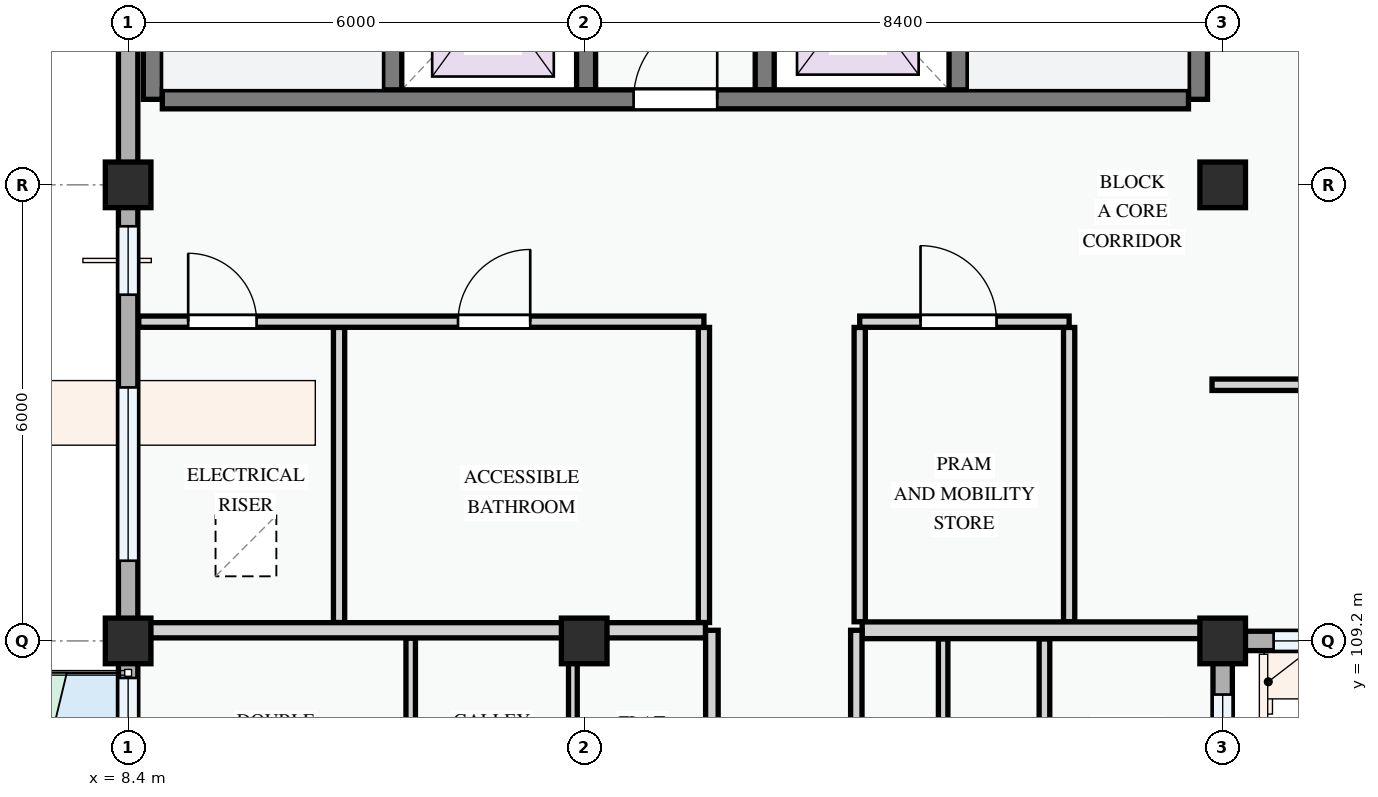
"""IFC4 building model, lengths in metres.
Left out: names, types, materials, properties, quantities, classifications, styles, units other than length and angle.
Written with IfcOpenShell. Run it as: python <this file> out.ifc"""

import sys

from ifc_helpers import new_model, si_unit, direction, frame, frame_2d, origin, origin_2d, place, context, subcontext, project, spatial, rectangle, extrude, element, fill, save


model = new_model("IFC4")
c1 = context("Model", 3, precision=1e-05, world=origin(), true_north=direction((0.0, 1.0)))
c2 = subcontext(c1, "Body", "Model", "MODEL_VIEW")
j1 = project(units=[si_unit("LENGTHUNIT", "METRE"), si_unit("PLANEANGLEUNIT", "RADIAN")], contexts=[c1])
p1 = place(None, origin())
s1 = spatial("IfcSite", under=j1, at=p1, CompositionType="ELEMENT")
p2 = place(p1, origin())
s2 = spatial("IfcBuilding", under=s1, at=p2, CompositionType="ELEMENT")
p3 = place(p2, frame((0.0, 0.0, 37.8)))
s3 = spatial("IfcBuildingStorey", under=s2, at=p3, CompositionType="ELEMENT", Elevation=37.8)
for number, where, z_axis, x_axis in (
    (1, (8.4, 109.2, 0.0), (0.0, 0.0, 1.0), (1.0, 0.0, 0.0)),
    (2, (8.4, 115.2, 0.0), (0.0, 0.0, 1.0), (1.0, 0.0, 0.0)),
    (3, (14.4, 109.2, 0.0), (0.0, 0.0, 1.0), (1.0, 0.0, 0.0)),
    (4, (22.8, 109.2, 0.0), (0.0, 0.0, 1.0), (1.0, 0.0, 0.0)),
    (5, (22.8, 115.2, 0.0), (0.0, 0.0, 1.0), (1.0, 0.0, 0.0)),
):
    element("IfcColumn", number, at=place(p3, frame(where, z_axis=z_axis, x_axis=x_axis)), inside=s3, PredefinedType="COLUMN", context=c2, shape_type="SweptSolid", body=[
        extrude(rectangle(XDim=0.6, YDim=0.6, at=origin_2d()), origin(), (0.0, 0.0, 1.0), 3.3),
    ])
p4 = place(p3, frame((22.8, 109.2, 0.0), z_axis=(0.0, 0.0, 1.0), x_axis=(1.0, 0.0, 0.0)))
e6 = element("IfcWall", 6, at=p4, inside=s3, PredefinedType="STANDARD", context=c2, shape_type="SweptSolid", body=[
    extrude(rectangle(XDim=6.0, YDim=0.255, at=frame_2d((3.0, 0.0))), origin(), (0.0, 0.0, 1.0), 2.525),
])
p5 = place(p4, frame((0.67, 0.0, 0.78)))
e7 = element("IfcOpeningElement", 7, at=p5, cuts=e6, PredefinedType="OPENING", context=c2, shape_type="SweptSolid", body=[
    extrude(rectangle(XDim=1.2, YDim=1.35, at=frame_2d((0.6, 0.675))), frame((0.0, 0.137, 0.0), z_axis=(0.0, -1.0, 0.0), x_axis=(1.0, 0.0, 0.0)), (0.0, 0.0, 1.0), 0.275),
])
p6 = place(p4, frame((3.48, 0.0, 0.78)))
e8 = element("IfcOpeningElement", 8, at=p6, cuts=e6, PredefinedType="OPENING", context=c2, shape_type="SweptSolid", body=[
    extrude(rectangle(XDim=1.2, YDim=1.5, at=frame_2d((0.6, 0.75))), frame((0.0, 0.137, 0.0), z_axis=(0.0, -1.0, 0.0), x_axis=(1.0, 0.0, 0.0)), (0.0, 0.0, 1.0), 0.275),
])
p7 = place(p3, frame((8.4, 123.6, 0.0), z_axis=(0.0, 0.0, 1.0), x_axis=(0.0, -1.0, 0.0)))
e9 = element("IfcWall", 9, at=p7, inside=s3, PredefinedType="STANDARD", context=c2, shape_type="SweptSolid", body=[
    extrude(rectangle(XDim=8.4, YDim=0.255, at=frame_2d((4.2, 0.0))), origin(), (0.0, 0.0, 1.0), 2.425),
])
p8 = place(p7, frame((1.371, 0.0, 0.78)))
e10 = element("IfcOpeningElement", 10, at=p8, cuts=e9, PredefinedType="OPENING", context=c2, shape_type="SweptSolid", body=[
    extrude(rectangle(XDim=1.25, YDim=1.3, at=frame_2d((0.625, 0.65))), frame((0.0, 0.137, 0.0), z_axis=(0.0, -1.0, 0.0), x_axis=(1.0, 0.0, 0.0)), (0.0, 0.0, 1.0), 0.275),
])
p9 = place(p7, frame((4.679, 0.0, 0.78)))
e11 = element("IfcOpeningElement", 11, at=p9, cuts=e9, PredefinedType="OPENING", context=c2, shape_type="SweptSolid", body=[
    extrude(rectangle(XDim=1.58, YDim=1.48, at=frame_2d((0.79, 0.74))), frame((0.0, 0.137, 0.0), z_axis=(0.0, -1.0, 0.0), x_axis=(1.0, 0.0, 0.0)), (0.0, 0.0, 1.0), 0.275),
])
p10 = place(p3, frame((8.4, 115.2, 0.0), z_axis=(0.0, 0.0, 1.0), x_axis=(0.0, -1.0, 0.0)))
e12 = element("IfcWall", 12, at=p10, inside=s3, PredefinedType="STANDARD", context=c2, shape_type="SweptSolid", body=[
    extrude(rectangle(XDim=6.0, YDim=0.255, at=frame_2d((3.0, 0.0))), origin(), (0.0, 0.0, 1.0), 2.575),
])
p11 = place(p10, frame((0.545, 0.0, 0.78)))
e13 = element("IfcOpeningElement", 13, at=p11, cuts=e12, PredefinedType="OPENING", context=c2, shape_type="SweptSolid", body=[
    extrude(rectangle(XDim=0.9, YDim=1.2, at=frame_2d((0.45, 0.6))), frame((0.0, 0.137, 0.0), z_axis=(0.0, -1.0, 0.0), x_axis=(1.0, 0.0, 0.0)), (0.0, 0.0, 1.0), 0.275),
])
p12 = place(p10, frame((2.665, 0.0, 0.78)))
e14 = element("IfcOpeningElement", 14, at=p12, cuts=e12, PredefinedType="OPENING", context=c2, shape_type="SweptSolid", body=[
    extrude(rectangle(XDim=2.28, YDim=1.46, at=frame_2d((1.14, 0.73))), frame((0.0, 0.137, 0.0), z_axis=(0.0, -1.0, 0.0), x_axis=(1.0, 0.0, 0.0)), (0.0, 0.0, 1.0), 0.275),
])
p13 = place(p3, frame((8.4, 109.2, 0.0), z_axis=(0.0, 0.0, 1.0), x_axis=(0.0, -1.0, 0.0)))
e15 = element("IfcWall", 15, at=p13, inside=s3, PredefinedType="STANDARD", context=c2, shape_type="SweptSolid", body=[
    extrude(rectangle(XDim=8.4, YDim=0.255, at=frame_2d((4.2, 0.0))), origin(), (0.0, 0.0, 1.0), 2.425),
])
p14 = place(p13, frame((4.268, 0.0, 0.0)))
e16 = element("IfcOpeningElement", 16, at=p14, cuts=e15, PredefinedType="OPENING", context=c2, shape_type="SweptSolid", body=[
    extrude(rectangle(XDim=1.4, YDim=2.2, at=frame_2d((0.7, 1.1))), frame((0.0, 0.137, 0.0), z_axis=(0.0, -1.0, 0.0), x_axis=(1.0, 0.0, 0.0)), (0.0, 0.0, 1.0), 0.275),
])
p15 = place(p13, frame((0.488, 0.0, 0.78)))
e17 = element("IfcOpeningElement", 17, at=p15, cuts=e15, PredefinedType="OPENING", context=c2, shape_type="SweptSolid", body=[
    extrude(rectangle(XDim=2.48, YDim=1.46, at=frame_2d((1.24, 0.73))), frame((0.0, 0.137, 0.0), z_axis=(0.0, -1.0, 0.0), x_axis=(1.0, 0.0, 0.0)), (0.0, 0.0, 1.0), 0.275),
])
p16 = place(p13, frame((6.99, 0.0, 0.78)))
e18 = element("IfcOpeningElement", 18, at=p16, cuts=e15, PredefinedType="OPENING", context=c2, shape_type="SweptSolid", body=[
    extrude(rectangle(XDim=0.9, YDim=1.2, at=frame_2d((0.45, 0.6))), frame((0.0, 0.137, 0.0), z_axis=(0.0, -1.0, 0.0), x_axis=(1.0, 0.0, 0.0)), (0.0, 0.0, 1.0), 0.275),
])
p17 = place(p3, frame((22.8, 100.8, 0.0), z_axis=(0.0, 0.0, 1.0), x_axis=(0.0, 1.0, 0.0)))
e19 = element("IfcWall", 19, at=p17, inside=s3, PredefinedType="STANDARD", context=c2, shape_type="SweptSolid", body=[
    extrude(rectangle(XDim=8.4, YDim=0.255, at=frame_2d((4.2, 0.0))), origin(), (0.0, 0.0, 1.0), 2.425),
])
p18 = place(p17, frame((0.51, 0.0, 0.78)))
e20 = element("IfcOpeningElement", 20, at=p18, cuts=e19, PredefinedType="OPENING", context=c2, shape_type="SweptSolid", body=[
    extrude(rectangle(XDim=0.9, YDim=1.2, at=frame_2d((0.45, 0.6))), frame((0.0, 0.137, 0.0), z_axis=(0.0, -1.0, 0.0), x_axis=(1.0, 0.0, 0.0)), (0.0, 0.0, 1.0), 0.275),
])
p19 = place(p17, frame((2.404, 0.0, 0.78)))
e21 = element("IfcOpeningElement", 21, at=p19, cuts=e19, PredefinedType="OPENING", context=c2, shape_type="SweptSolid", body=[
    extrude(rectangle(XDim=1.92, YDim=1.44, at=frame_2d((0.96, 0.72))), frame((0.0, 0.137, 0.0), z_axis=(0.0, -1.0, 0.0), x_axis=(1.0, 0.0, 0.0)), (0.0, 0.0, 1.0), 0.275),
])
p20 = place(p17, frame((5.514, 0.0, 0.78)))
e22 = element("IfcOpeningElement", 22, at=p20, cuts=e19, PredefinedType="OPENING", context=c2, shape_type="SweptSolid", body=[
    extrude(rectangle(XDim=2.18, YDim=1.48, at=frame_2d((1.09, 0.74))), frame((0.0, 0.137, 0.0), z_axis=(0.0, -1.0, 0.0), x_axis=(1.0, 0.0, 0.0)), (0.0, 0.0, 1.0), 0.275),
])
p21 = place(p3, frame((11.875, 123.25, 0.0), z_axis=(0.0, 0.0, 1.0), x_axis=(0.0, -1.0, 0.0)))
e23 = element("IfcWall", 23, at=p21, inside=s3, PredefinedType="SHEAR", context=c2, shape_type="SweptSolid", body=[
    extrude(rectangle(XDim=6.925, YDim=0.25, at=frame_2d((3.462, 0.0))), origin(), (0.0, 0.0, 1.0), 3.0),
])
p22 = place(p21, frame((0.35, 0.0, 0.0)))
e24 = element("IfcOpeningElement", 24, at=p22, cuts=e23, PredefinedType="OPENING", context=c2, shape_type="SweptSolid", body=[
    extrude(rectangle(XDim=0.95, YDim=2.1, at=frame_2d((0.475, 1.05))), frame((0.0, 0.135, 0.0), z_axis=(0.0, -1.0, 0.0), x_axis=(1.0, 0.0, 0.0)), (0.0, 0.0, 1.0), 0.27),
])
p23 = place(p3, frame((8.725, 123.4, 0.0), z_axis=(0.0, 0.0, 1.0), x_axis=(0.0, -1.0, 0.0)))
e25 = element("IfcWall", 25, at=p23, inside=s3, PredefinedType="SHEAR", context=c2, shape_type="SweptSolid", body=[
    extrude(rectangle(XDim=7.075, YDim=0.25, at=frame_2d((3.538, 0.0))), origin(), (0.0, 0.0, 1.0), 3.0),
])
p24 = place(p3, frame((22.475, 123.25, 0.0), z_axis=(0.0, 0.0, 1.0), x_axis=(0.0, -1.0, 0.0)))
e26 = element("IfcWall", 26, at=p24, inside=s3, PredefinedType="SHEAR", context=c2, shape_type="SweptSolid", body=[
    extrude(rectangle(XDim=6.925, YDim=0.25, at=frame_2d((3.462, 0.0))), origin(), (0.0, 0.0, 1.0), 3.0),
])
p25 = place(p3, frame((19.325, 123.25, 0.0), z_axis=(0.0, 0.0, 1.0), x_axis=(0.0, -1.0, 0.0)))
e27 = element("IfcWall", 27, at=p25, inside=s3, PredefinedType="SHEAR", context=c2, shape_type="SweptSolid", body=[
    extrude(rectangle(XDim=6.925, YDim=0.25, at=frame_2d((3.462, 0.0))), origin(), (0.0, 0.0, 1.0), 3.0),
])
p26 = place(p25, frame((0.35, 0.0, 0.0)))
e28 = element("IfcOpeningElement", 28, at=p26, cuts=e27, PredefinedType="OPENING", context=c2, shape_type="SweptSolid", body=[
    extrude(rectangle(XDim=0.95, YDim=2.1, at=frame_2d((0.475, 1.05))), frame((0.0, 0.135, 0.0), z_axis=(0.0, -1.0, 0.0), x_axis=(1.0, 0.0, 0.0)), (0.0, 0.0, 1.0), 0.27),
])
for number, where, z_axis, x_axis in (
    (29, (14.425, 118.875, 0.0), (0.0, 0.0, 1.0), (0.0, -1.0, 0.0)),
    (30, (16.775, 118.875, 0.0), (0.0, 0.0, 1.0), (0.0, -1.0, 0.0)),
):
    element("IfcWall", number, at=place(p3, frame(where, z_axis=z_axis, x_axis=x_axis)), inside=s3, PredefinedType="SHEAR", context=c2, shape_type="SweptSolid", body=[
        extrude(rectangle(XDim=2.425, YDim=0.25, at=frame_2d((1.212, 0.0))), origin(), (0.0, 0.0, 1.0), 3.0),
    ])
p27 = place(p3, frame((8.85, 116.325, 0.0), z_axis=(0.0, 0.0, 1.0), x_axis=(1.0, 0.0, 0.0)))
e31 = element("IfcWall", 31, at=p27, inside=s3, PredefinedType="SHEAR", context=c2, shape_type="SweptSolid", body=[
    extrude(rectangle(XDim=13.5, YDim=0.25, at=frame_2d((6.75, 0.0))), origin(), (0.0, 0.0, 1.0), 3.0),
])
p28 = place(p27, frame((6.2, 0.0, 0.0)))
e32 = element("IfcOpeningElement", 32, at=p28, cuts=e31, PredefinedType="OPENING", context=c2, shape_type="SweptSolid", body=[
    extrude(rectangle(XDim=1.1, YDim=2.15, at=frame_2d((0.55, 1.075))), frame((0.0, 0.135, 0.0), z_axis=(0.0, -1.0, 0.0), x_axis=(1.0, 0.0, 0.0)), (0.0, 0.0, 1.0), 0.27),
])
for number, where, z_axis, x_axis in (
    (33, (11.175, 113.324, 0.0), (0.0, 0.0, 1.0), (0.0, -1.0, 0.0)),
    (34, (15.975, 113.324, 0.0), (0.0, 0.0, 1.0), (0.0, -1.0, 0.0)),
):
    element("IfcWall", number, at=place(p3, frame(where, z_axis=z_axis, x_axis=x_axis)), inside=s3, PredefinedType="PARTITIONING", context=c2, shape_type="SweptSolid", body=[
        extrude(rectangle(XDim=3.882, YDim=0.148, at=frame_2d((1.941, 0.0))), origin(), (0.0, 0.0, 1.0), 3.0),
    ])
for number, where, z_axis, x_axis in (
    (35, (18.025, 113.324, 0.0), (0.0, 0.0, 1.0), (0.0, -1.0, 0.0)),
    (36, (20.78, 113.324, 0.0), (0.0, 0.0, 1.0), (0.0, -1.0, 0.0)),
):
    element("IfcWall", number, at=place(p3, frame(where, z_axis=z_axis, x_axis=x_axis)), inside=s3, PredefinedType="PARTITIONING", context=c2, shape_type="SweptSolid", body=[
        extrude(rectangle(XDim=3.872, YDim=0.148, at=frame_2d((1.936, 0.0))), origin(), (0.0, 0.0, 1.0), 3.0),
    ])
p29 = place(p3, frame((8.54, 113.4, 0.0), z_axis=(0.0, 0.0, 1.0), x_axis=(1.0, 0.0, 0.0)))
e37 = element("IfcWall", 37, at=p29, inside=s3, PredefinedType="PARTITIONING", context=c2, shape_type="SweptSolid", body=[
    extrude(rectangle(XDim=7.435, YDim=0.148, at=frame_2d((3.718, 0.0))), origin(), (0.0, 0.0, 1.0), 3.0),
])
p30 = place(p29, frame((0.65, 0.0, 0.0)))
e38 = element("IfcOpeningElement", 38, at=p30, cuts=e37, PredefinedType="OPENING", context=c2, shape_type="SweptSolid", body=[
    extrude(rectangle(XDim=0.9, YDim=2.1, at=frame_2d((0.45, 1.05))), frame((0.0, 0.084, 0.0), z_axis=(0.0, -1.0, 0.0), x_axis=(1.0, 0.0, 0.0)), (0.0, 0.0, 1.0), 0.168),
])
p31 = place(p29, frame((4.2, 0.0, 0.0)))
e39 = element("IfcOpeningElement", 39, at=p31, cuts=e37, PredefinedType="OPENING", context=c2, shape_type="SweptSolid", body=[
    extrude(rectangle(XDim=0.95, YDim=2.1, at=frame_2d((0.475, 1.05))), frame((0.0, 0.084, 0.0), z_axis=(0.0, -1.0, 0.0), x_axis=(1.0, 0.0, 0.0)), (0.0, 0.0, 1.0), 0.168),
])
p32 = place(p3, frame((18.025, 113.4, 0.0), z_axis=(0.0, 0.0, 1.0), x_axis=(1.0, 0.0, 0.0)))
e40 = element("IfcWall", 40, at=p32, inside=s3, PredefinedType="PARTITIONING", context=c2, shape_type="SweptSolid", body=[
    extrude(rectangle(XDim=2.755, YDim=0.148, at=frame_2d((1.377, 0.0))), origin(), (0.0, 0.0, 1.0), 3.0),
])
p33 = place(p32, frame((0.8, 0.0, 0.0)))
e41 = element("IfcOpeningElement", 41, at=p33, cuts=e40, PredefinedType="OPENING", context=c2, shape_type="SweptSolid", body=[
    extrude(rectangle(XDim=1.0, YDim=2.15, at=frame_2d((0.5, 1.075))), frame((0.0, 0.084, 0.0), z_axis=(0.0, -1.0, 0.0), x_axis=(1.0, 0.0, 0.0)), (0.0, 0.0, 1.0), 0.168),
])
p34 = place(p3, frame((22.66, 112.57, 0.0), z_axis=(0.0, 0.0, 1.0), x_axis=(1.0, 0.0, 0.0)))
e42 = element("IfcWall", 42, at=p34, inside=s3, PredefinedType="PARTITIONING", context=c2, shape_type="SweptSolid", body=[
    extrude(rectangle(XDim=2.406, YDim=0.15, at=frame_2d((1.203, 0.0))), origin(), (0.0, 0.0, 1.0), 3.0),
])
p35 = place(p3, frame((12.118, 106.007, 0.0), z_axis=(0.0, 0.0, 1.0), x_axis=(0.0, 1.0, 0.0)))
e43 = element("IfcWall", 43, at=p35, inside=s3, PredefinedType="PARTITIONING", context=c2, shape_type="SweptSolid", body=[
    extrude(rectangle(XDim=3.231, YDim=0.125, at=frame_2d((1.615, 0.0))), origin(), (0.0, 0.0, 1.0), 3.0),
])
p36 = place(p3, frame((14.251, 106.007, 0.0), z_axis=(0.0, 0.0, 1.0), x_axis=(0.0, 1.0, 0.0)))
e44 = element("IfcWall", 44, at=p36, inside=s3, PredefinedType="PARTITIONING", context=c2, shape_type="SweptSolid", body=[
    extrude(rectangle(XDim=3.231, YDim=0.115, at=frame_2d((1.615, 0.0))), origin(), (0.0, 0.0, 1.0), 2.425),
])
p37 = place(p3, frame((20.455, 105.851, 0.0), z_axis=(0.0, 0.0, 1.0), x_axis=(0.0, 1.0, 0.0)))
e45 = element("IfcWall", 45, at=p37, inside=s3, PredefinedType="PARTITIONING", context=c2, shape_type="SweptSolid", body=[
    extrude(rectangle(XDim=3.377, YDim=0.14, at=frame_2d((1.688, 0.0))), origin(), (0.0, 0.0, 1.0), 3.0),
])
p38 = place(p3, frame((19.122, 105.851, 0.0), z_axis=(0.0, 0.0, 1.0), x_axis=(0.0, 1.0, 0.0)))
e46 = element("IfcWall", 46, at=p38, inside=s3, PredefinedType="PARTITIONING", context=c2, shape_type="SweptSolid", body=[
    extrude(rectangle(XDim=3.377, YDim=0.125, at=frame_2d((1.688, 0.0))), origin(), (0.0, 0.0, 1.0), 3.0),
])
p39 = place(p3, frame((8.53, 109.34, 0.0), z_axis=(0.0, 0.0, 1.0), x_axis=(1.0, 0.0, 0.0)))
e47 = element("IfcWall", 47, at=p39, inside=s3, PredefinedType="PARTITIONING", context=c2, shape_type="SweptSolid", body=[
    extrude(rectangle(XDim=7.466, YDim=0.2, at=frame_2d((3.733, 0.0))), origin(), (0.0, 0.0, 1.0), 2.375),
])
p40 = place(p3, frame((18.057, 109.34, 0.0), z_axis=(0.0, 0.0, 1.0), x_axis=(1.0, 0.0, 0.0)))
e48 = element("IfcWall", 48, at=p40, inside=s3, PredefinedType="PARTITIONING", context=c2, shape_type="SweptSolid", body=[
    extrude(rectangle(XDim=4.683, YDim=0.22, at=frame_2d((2.342, 0.0))), origin(), (0.0, 0.0, 1.0), 2.375),
])
p41 = place(p3, frame((16.08, 86.46, 0.0), z_axis=(0.0, 0.0, 1.0), x_axis=(0.0, 1.0, 0.0)))
e49 = element("IfcWall", 49, at=p41, inside=s3, PredefinedType="PARTITIONING", context=c2, shape_type="SweptSolid", body=[
    extrude(rectangle(XDim=22.88, YDim=0.165, at=frame_2d((11.44, 0.0))), origin(), (0.0, 0.0, 1.0), 3.0),
])
p42 = place(p41, frame((2.1, 0.0, 0.0)))
e50 = element("IfcOpeningElement", 50, at=p42, cuts=e49, PredefinedType="OPENING", context=c2, shape_type="SweptSolid", body=[
    extrude(rectangle(XDim=0.92, YDim=2.1, at=frame_2d((0.46, 1.05))), frame((0.0, 0.093, 0.0), z_axis=(0.0, -1.0, 0.0), x_axis=(1.0, 0.0, 0.0)), (0.0, 0.0, 1.0), 0.185),
])
p43 = place(p41, frame((10.135, 0.0, 0.0)))
e51 = element("IfcOpeningElement", 51, at=p43, cuts=e49, PredefinedType="OPENING", context=c2, shape_type="SweptSolid", body=[
    extrude(rectangle(XDim=0.92, YDim=2.1, at=frame_2d((0.46, 1.05))), frame((0.0, 0.093, 0.0), z_axis=(0.0, -1.0, 0.0), x_axis=(1.0, 0.0, 0.0)), (0.0, 0.0, 1.0), 0.185),
])
p44 = place(p41, frame((18.083, 0.0, 0.0)))
e52 = element("IfcOpeningElement", 52, at=p44, cuts=e49, PredefinedType="OPENING", context=c2, shape_type="SweptSolid", body=[
    extrude(rectangle(XDim=0.92, YDim=2.1, at=frame_2d((0.46, 1.05))), frame((0.0, 0.093, 0.0), z_axis=(0.0, -1.0, 0.0), x_axis=(1.0, 0.0, 0.0)), (0.0, 0.0, 1.0), 0.185),
])
p45 = place(p3, frame((17.98, 86.46, 0.0), z_axis=(0.0, 0.0, 1.0), x_axis=(0.0, 1.0, 0.0)))
e53 = element("IfcWall", 53, at=p45, inside=s3, PredefinedType="PARTITIONING", context=c2, shape_type="SweptSolid", body=[
    extrude(rectangle(XDim=22.88, YDim=0.15, at=frame_2d((11.44, 0.0))), origin(), (0.0, 0.0, 1.0), 3.0),
])
p46 = place(p45, frame((1.968, 0.0, 0.0)))
e54 = element("IfcOpeningElement", 54, at=p46, cuts=e53, PredefinedType="OPENING", context=c2, shape_type="SweptSolid", body=[
    extrude(rectangle(XDim=0.96, YDim=2.12, at=frame_2d((0.48, 1.06))), frame((0.0, 0.085, 0.0), z_axis=(0.0, -1.0, 0.0), x_axis=(1.0, 0.0, 0.0)), (0.0, 0.0, 1.0), 0.17),
])
p47 = place(p45, frame((9.946, 0.0, 0.0)))
e55 = element("IfcOpeningElement", 55, at=p47, cuts=e53, PredefinedType="OPENING", context=c2, shape_type="SweptSolid", body=[
    extrude(rectangle(XDim=0.92, YDim=2.1, at=frame_2d((0.46, 1.05))), frame((0.0, 0.085, 0.0), z_axis=(0.0, -1.0, 0.0), x_axis=(1.0, 0.0, 0.0)), (0.0, 0.0, 1.0), 0.17),
])
p48 = place(p45, frame((18.072, 0.0, 0.0)))
e56 = element("IfcOpeningElement", 56, at=p48, cuts=e53, PredefinedType="OPENING", context=c2, shape_type="SweptSolid", body=[
    extrude(rectangle(XDim=0.92, YDim=2.1, at=frame_2d((0.46, 1.05))), frame((0.0, 0.085, 0.0), z_axis=(0.0, -1.0, 0.0), x_axis=(1.0, 0.0, 0.0)), (0.0, 0.0, 1.0), 0.17),
])
p49 = place(p5, origin())
e57 = element("IfcWindow", 57, at=p49, inside=s3, PartitioningType="SINGLE_PANEL", PredefinedType="WINDOW", context=c2, shape_type="SweptSolid", body=[
    extrude(rectangle(XDim=1.2, YDim=1.35, at=frame_2d((0.6, 0.675))), frame((0.0, 0.03, 0.0), z_axis=(0.0, -1.0, 0.0), x_axis=(1.0, 0.0, 0.0)), (0.0, 0.0, 1.0), 0.06),
])
fill(e7, e57)
p50 = place(p11, origin())
e58 = element("IfcWindow", 58, at=p50, inside=s3, PartitioningType="SINGLE_PANEL", PredefinedType="WINDOW", context=c2, shape_type="SweptSolid", body=[
    extrude(rectangle(XDim=0.9, YDim=1.2, at=frame_2d((0.45, 0.6))), frame((0.0, 0.03, 0.0), z_axis=(0.0, -1.0, 0.0), x_axis=(1.0, 0.0, 0.0)), (0.0, 0.0, 1.0), 0.06),
])
fill(e13, e58)
p51 = place(p12, origin())
e59 = element("IfcWindow", 59, at=p51, inside=s3, PartitioningType="DOUBLE_PANEL_VERTICAL", PredefinedType="WINDOW", context=c2, shape_type="SweptSolid", body=[
    extrude(rectangle(XDim=2.28, YDim=1.46, at=frame_2d((1.14, 0.73))), frame((0.0, 0.03, 0.0), z_axis=(0.0, -1.0, 0.0), x_axis=(1.0, 0.0, 0.0)), (0.0, 0.0, 1.0), 0.06),
])
fill(e14, e59)
p52 = place(p15, origin())
e60 = element("IfcWindow", 60, at=p52, inside=s3, PartitioningType="DOUBLE_PANEL_VERTICAL", PredefinedType="WINDOW", context=c2, shape_type="SweptSolid", body=[
    extrude(rectangle(XDim=2.48, YDim=1.46, at=frame_2d((1.24, 0.73))), frame((0.0, 0.03, 0.0), z_axis=(0.0, -1.0, 0.0), x_axis=(1.0, 0.0, 0.0)), (0.0, 0.0, 1.0), 0.06),
])
fill(e17, e60)
p53 = place(p20, origin())
e61 = element("IfcWindow", 61, at=p53, inside=s3, PartitioningType="DOUBLE_PANEL_VERTICAL", PredefinedType="WINDOW", context=c2, shape_type="SweptSolid", body=[
    extrude(rectangle(XDim=2.18, YDim=1.48, at=frame_2d((1.09, 0.74))), frame((0.0, 0.03, 0.0), z_axis=(0.0, -1.0, 0.0), x_axis=(1.0, 0.0, 0.0)), (0.0, 0.0, 1.0), 0.06),
])
fill(e22, e61)
p54 = place(p28, origin())
e62 = element("IfcDoor", 62, at=p54, inside=s3, OperationType="SINGLE_SWING_RIGHT", PredefinedType="DOOR", context=c2, shape_type="SweptSolid", body=[
    extrude(rectangle(XDim=1.1, YDim=2.15, at=frame_2d((0.55, 1.075))), frame((0.0, 0.025, 0.0), z_axis=(0.0, -1.0, 0.0), x_axis=(1.0, 0.0, 0.0)), (0.0, 0.0, 1.0), 0.05),
])
fill(e32, e62)
p55 = place(p30, origin())
e63 = element("IfcDoor", 63, at=p55, inside=s3, OperationType="SINGLE_SWING_LEFT", PredefinedType="DOOR", context=c2, shape_type="SweptSolid", body=[
    extrude(rectangle(XDim=0.9, YDim=2.1, at=frame_2d((0.45, 1.05))), frame((0.0, 0.025, 0.0), z_axis=(0.0, -1.0, 0.0), x_axis=(1.0, 0.0, 0.0)), (0.0, 0.0, 1.0), 0.05),
])
fill(e38, e63)
p56 = place(p31, origin())
e64 = element("IfcDoor", 64, at=p56, inside=s3, OperationType="SINGLE_SWING_RIGHT", PredefinedType="DOOR", context=c2, shape_type="SweptSolid", body=[
    extrude(rectangle(XDim=0.95, YDim=2.1, at=frame_2d((0.475, 1.05))), frame((0.0, 0.025, 0.0), z_axis=(0.0, -1.0, 0.0), x_axis=(1.0, 0.0, 0.0)), (0.0, 0.0, 1.0), 0.05),
])
fill(e39, e64)
p57 = place(p33, origin())
e65 = element("IfcDoor", 65, at=p57, inside=s3, OperationType="SINGLE_SWING_LEFT", PredefinedType="DOOR", context=c2, shape_type="SweptSolid", body=[
    extrude(rectangle(XDim=1.0, YDim=2.15, at=frame_2d((0.5, 1.075))), frame((0.0, 0.025, 0.0), z_axis=(0.0, -1.0, 0.0), x_axis=(1.0, 0.0, 0.0)), (0.0, 0.0, 1.0), 0.05),
])
fill(e41, e65)
save(model, sys.argv[1])
